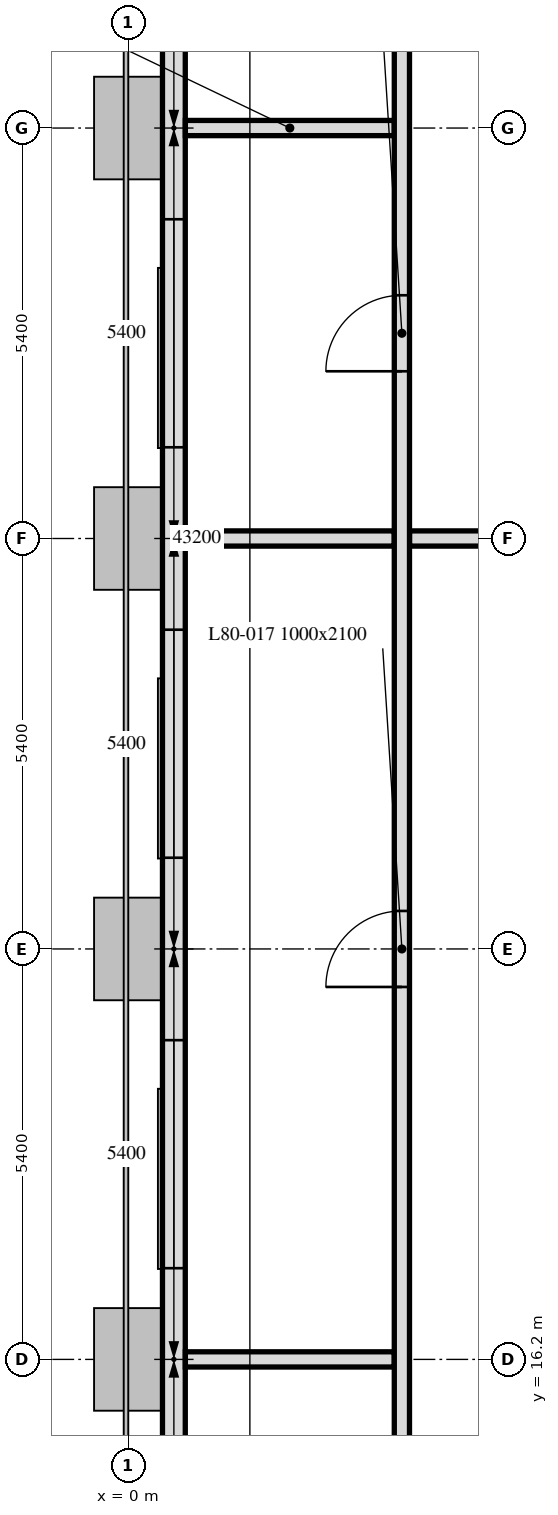
"""IFC4 building model, lengths in metres.
Left out: names, types, materials, properties, quantities, classifications, styles, units other than length and angle.
Written with IfcOpenShell. Run it as: python <this file> out.ifc"""

import sys

from ifc_helpers import new_model, si_unit, direction, frame, frame_2d, origin, place, context, subcontext, project, spatial, polyline, rectangle, outline, extrude, element, fill, save


model = new_model("IFC4")
c1 = context("Model", 3, precision=1e-05, world=origin(), true_north=direction((0.0, 1.0)))
c2 = subcontext(c1, "Body", "Model", "MODEL_VIEW")
j1 = project(units=[si_unit("LENGTHUNIT", "METRE"), si_unit("PLANEANGLEUNIT", "RADIAN")], contexts=[c1])
p1 = place(None, origin())
s1 = spatial("IfcSite", under=j1, at=p1, CompositionType="ELEMENT")
p2 = place(p1, origin())
s2 = spatial("IfcBuilding", under=s1, at=p2, CompositionType="ELEMENT")
p3 = place(p2, frame((0.0, 0.0, 321.7)))
s3 = spatial("IfcBuildingStorey", under=s2, at=p3, CompositionType="ELEMENT", Elevation=321.7)
p4 = place(p3, frame((0.6, 43.014, 0.0), z_axis=(0.0, 0.0, 1.0), x_axis=(0.0, -1.0, 0.0)))
e1 = element("IfcWall", 1, at=p4, inside=s3, PredefinedType="SOLIDWALL", context=c2, shape_type="SweptSolid", body=[
    extrude(outline(polyline([(0.0, 0.0), (32.027, 0.0), (32.027, 3.267), (31.434, 3.267), (30.841, 3.267), (30.248, 3.267), (29.655, 3.267), (29.062, 3.267), (28.469, 3.267), (27.875, 3.267), (27.282, 3.267), (26.689, 3.267), (26.096, 3.267), (25.503, 3.267), (24.91, 3.267), (24.317, 3.267), (23.724, 3.267), (23.131, 3.267), (22.538, 3.267), (21.945, 3.267), (21.352, 3.267), (20.758, 3.267), (20.165, 3.267), (19.572, 3.267), (18.979, 3.267), (18.386, 3.267), (17.793, 3.267), (17.2, 3.267), (16.607, 3.267), (16.014, 3.267), (15.42, 3.267), (14.827, 3.267), (14.234, 3.267), (13.641, 3.267), (13.048, 3.267), (12.455, 3.267), (11.862, 3.267), (11.269, 3.267), (10.676, 3.267), (10.083, 3.267), (9.49, 3.267), (8.896, 3.267), (8.303, 3.267), (7.71, 3.267), (7.117, 3.267), (6.524, 3.267), (5.931, 3.267), (5.338, 3.267), (4.745, 3.267), (4.152, 3.267), (3.559, 3.267), (2.966, 3.267), (2.372, 3.267), (1.779, 3.267), (1.186, 3.267), (0.593, 3.267), (0.0, 3.267), (0.0, 0.0)])), frame((0.0, 0.15, 0.0), z_axis=(0.0, -1.0, 0.0), x_axis=(1.0, 0.0, 0.0)), (0.0, 0.0, 1.0), 0.3),
])
p5 = place(p4, frame((1.81, 0.0, 0.6)))
e2 = element("IfcOpeningElement", 2, at=p5, cuts=e1, PredefinedType="OPENING", context=c2, shape_type="SweptSolid", body=[
    extrude(rectangle(XDim=3.0, YDim=1.8, at=frame_2d((1.5, 0.9))), frame((0.0, 0.16, 0.0), z_axis=(0.0, -1.0, 0.0), x_axis=(1.0, 0.0, 0.0)), (0.0, 0.0, 1.0), 0.32),
])
p6 = place(p4, frame((6.414, 0.0, 0.6)))
e3 = element("IfcOpeningElement", 3, at=p6, cuts=e1, PredefinedType="OPENING", context=c2, shape_type="SweptSolid", body=[
    extrude(rectangle(XDim=3.0, YDim=1.8, at=frame_2d((1.5, 0.9))), frame((0.0, 0.16, 0.0), z_axis=(0.0, -1.0, 0.0), x_axis=(1.0, 0.0, 0.0)), (0.0, 0.0, 1.0), 0.32),
])
p7 = place(p4, frame((11.814, 0.0, 0.6)))
e4 = element("IfcOpeningElement", 4, at=p7, cuts=e1, PredefinedType="OPENING", context=c2, shape_type="SweptSolid", body=[
    extrude(rectangle(XDim=3.0, YDim=1.8, at=frame_2d((1.5, 0.9))), frame((0.0, 0.16, 0.0), z_axis=(0.0, -1.0, 0.0), x_axis=(1.0, 0.0, 0.0)), (0.0, 0.0, 1.0), 0.32),
])
p8 = place(p4, frame((17.214, 0.0, 0.6)))
e5 = element("IfcOpeningElement", 5, at=p8, cuts=e1, PredefinedType="OPENING", context=c2, shape_type="SweptSolid", body=[
    extrude(rectangle(XDim=3.0, YDim=1.8, at=frame_2d((1.5, 0.9))), frame((0.0, 0.16, 0.0), z_axis=(0.0, -1.0, 0.0), x_axis=(1.0, 0.0, 0.0)), (0.0, 0.0, 1.0), 0.32),
])
p9 = place(p4, frame((22.614, 0.0, 0.6)))
e6 = element("IfcOpeningElement", 6, at=p9, cuts=e1, PredefinedType="OPENING", context=c2, shape_type="SweptSolid", body=[
    extrude(rectangle(XDim=3.0, YDim=1.8, at=frame_2d((1.5, 0.9))), frame((0.0, 0.16, 0.0), z_axis=(0.0, -1.0, 0.0), x_axis=(1.0, 0.0, 0.0)), (0.0, 0.0, 1.0), 0.32),
])
p10 = place(p4, frame((28.014, 0.0, 0.6)))
e7 = element("IfcOpeningElement", 7, at=p10, cuts=e1, PredefinedType="OPENING", context=c2, shape_type="SweptSolid", body=[
    extrude(rectangle(XDim=3.0, YDim=1.8, at=frame_2d((1.5, 0.9))), frame((0.0, 0.16, 0.0), z_axis=(0.0, -1.0, 0.0), x_axis=(1.0, 0.0, 0.0)), (0.0, 0.0, 1.0), 0.32),
])
for number, where, z_axis, x_axis in (
    (8, (0.751, 32.4, 0.0), (0.0, 0.0, 1.0), (1.0, 0.0, 0.0)),
    (9, (0.751, 27.0, 0.0), (0.0, 0.0, 1.0), (1.0, 0.0, 0.0)),
):
    element("IfcWall", number, at=place(p3, frame(where, z_axis=z_axis, x_axis=x_axis)), inside=s3, PredefinedType="PARTITIONING", context=c2, shape_type="SweptSolid", body=[
        extrude(outline(polyline([(0.0, 0.0), (2.749, 0.0), (2.749, 4.556), (0.0, 3.334), (0.0, 0.0)])), frame((0.0, 0.1, 0.0), z_axis=(0.0, -1.0, 0.0), x_axis=(1.0, 0.0, 0.0)), (0.0, 0.0, 1.0), 0.2),
    ])
p11 = place(p3, frame((3.7, 27.0, 0.0), z_axis=(0.0, 0.0, 1.0), x_axis=(1.0, 0.0, 0.0)))
e10 = element("IfcWall", 10, at=p11, inside=s3, PredefinedType="PARTITIONING", context=c2, shape_type="SweptSolid", body=[
    extrude(outline(polyline([(0.0, 0.0), (1.7, 0.0), (1.7, 5.4), (0.0, 4.645), (0.0, 0.0)])), frame((0.0, 0.1, 0.0), z_axis=(0.0, -1.0, 0.0), x_axis=(1.0, 0.0, 0.0)), (0.0, 0.0, 1.0), 0.2),
])
p12 = place(p3, frame((3.5, 16.2, 0.0), z_axis=(0.0, 0.0, 1.0), x_axis=(-1.0, 0.0, 0.0)))
e11 = element("IfcWall", 11, at=p12, inside=s3, PredefinedType="PARTITIONING", context=c2, shape_type="SweptSolid", body=[
    extrude(outline(polyline([(0.0, 0.0), (2.749, 0.0), (2.749, 3.334), (0.0, 4.556), (0.0, 0.0)])), frame((0.0, 0.1, 0.0), z_axis=(0.0, -1.0, 0.0), x_axis=(1.0, 0.0, 0.0)), (0.0, 0.0, 1.0), 0.2),
])
p13 = place(p3, frame((3.6, 11.35, 0.0), z_axis=(0.0, 0.0, 1.0), x_axis=(0.0, 1.0, 0.0)))
e12 = element("IfcWall", 12, at=p13, inside=s3, PredefinedType="PARTITIONING", context=c2, shape_type="SweptSolid", body=[
    extrude(rectangle(XDim=29.95, YDim=0.2, at=frame_2d((14.975, 0.0))), origin(), (0.0, 0.0, 1.0), 4.6),
])
p14 = place(p13, frame((23.508, 0.0, 0.0)))
e13 = element("IfcOpeningElement", 13, at=p14, cuts=e12, PredefinedType="OPENING", context=c2, shape_type="SweptSolid", body=[
    extrude(rectangle(XDim=1.0, YDim=2.1, at=frame_2d((0.5, 1.05))), frame((0.0, 0.1, 0.0), z_axis=(0.0, -1.0, 0.0), x_axis=(1.0, 0.0, 0.0)), (0.0, 0.0, 1.0), 0.2),
])
p15 = place(p13, frame((17.85, 0.0, 0.0)))
e14 = element("IfcOpeningElement", 14, at=p15, cuts=e12, PredefinedType="OPENING", context=c2, shape_type="SweptSolid", body=[
    extrude(rectangle(XDim=1.0, YDim=2.1, at=frame_2d((0.5, 1.05))), frame((0.0, 0.1, 0.0), z_axis=(0.0, -1.0, 0.0), x_axis=(1.0, 0.0, 0.0)), (0.0, 0.0, 1.0), 0.2),
])
p16 = place(p13, frame((1.875, 0.0, 0.0)))
e15 = element("IfcOpeningElement", 15, at=p16, cuts=e12, PredefinedType="OPENING", context=c2, shape_type="SweptSolid", body=[
    extrude(rectangle(XDim=1.0, YDim=2.1, at=frame_2d((0.5, 1.05))), frame((0.0, 0.1, 0.0), z_axis=(0.0, -1.0, 0.0), x_axis=(1.0, 0.0, 0.0)), (0.0, 0.0, 1.0), 0.2),
])
p17 = place(p13, frame((9.75, 0.0, 0.0)))
e16 = element("IfcOpeningElement", 16, at=p17, cuts=e12, PredefinedType="OPENING", context=c2, shape_type="SweptSolid", body=[
    extrude(rectangle(XDim=1.0, YDim=2.1, at=frame_2d((0.5, 1.05))), frame((0.0, 0.1, 0.0), z_axis=(0.0, -1.0, 0.0), x_axis=(1.0, 0.0, 0.0)), (0.0, 0.0, 1.0), 0.2),
])
p18 = place(p7, origin())
e17 = element("IfcWindow", 17, at=p18, inside=s3, PartitioningType="SINGLE_PANEL", PredefinedType="WINDOW", context=c2, shape_type="SweptSolid", body=[
    extrude(rectangle(XDim=3.0, YDim=1.8, at=frame_2d((1.5, 0.9))), frame((0.0, 0.03, 0.0), z_axis=(0.0, -1.0, 0.0), x_axis=(1.0, 0.0, 0.0)), (0.0, 0.0, 1.0), 0.06),
])
fill(e4, e17)
p19 = place(p8, origin())
e18 = element("IfcWindow", 18, at=p19, inside=s3, PartitioningType="SINGLE_PANEL", PredefinedType="WINDOW", context=c2, shape_type="SweptSolid", body=[
    extrude(rectangle(XDim=3.0, YDim=1.8, at=frame_2d((1.5, 0.9))), frame((0.0, 0.03, 0.0), z_axis=(0.0, -1.0, 0.0), x_axis=(1.0, 0.0, 0.0)), (0.0, 0.0, 1.0), 0.06),
])
fill(e5, e18)
p20 = place(p9, origin())
e19 = element("IfcWindow", 19, at=p20, inside=s3, PartitioningType="SINGLE_PANEL", PredefinedType="WINDOW", context=c2, shape_type="SweptSolid", body=[
    extrude(rectangle(XDim=3.0, YDim=1.8, at=frame_2d((1.5, 0.9))), frame((0.0, 0.03, 0.0), z_axis=(0.0, -1.0, 0.0), x_axis=(1.0, 0.0, 0.0)), (0.0, 0.0, 1.0), 0.06),
])
fill(e6, e19)
p21 = place(p15, origin())
e20 = element("IfcDoor", 20, at=p21, inside=s3, OperationType="SINGLE_SWING_LEFT", PredefinedType="DOOR", context=c2, shape_type="SweptSolid", body=[
    extrude(rectangle(XDim=1.0, YDim=2.1, at=frame_2d((0.5, 1.05))), frame((0.0, 0.025, 0.0), z_axis=(0.0, -1.0, 0.0), x_axis=(1.0, 0.0, 0.0)), (0.0, 0.0, 1.0), 0.05),
])
fill(e14, e20)
p22 = place(p17, origin())
e21 = element("IfcDoor", 21, at=p22, inside=s3, OperationType="SINGLE_SWING_LEFT", PredefinedType="DOOR", context=c2, shape_type="SweptSolid", body=[
    extrude(rectangle(XDim=1.0, YDim=2.1, at=frame_2d((0.5, 1.05))), frame((0.0, 0.025, 0.0), z_axis=(0.0, -1.0, 0.0), x_axis=(1.0, 0.0, 0.0)), (0.0, 0.0, 1.0), 0.05),
])
fill(e16, e21)
save(model, sys.argv[1])
